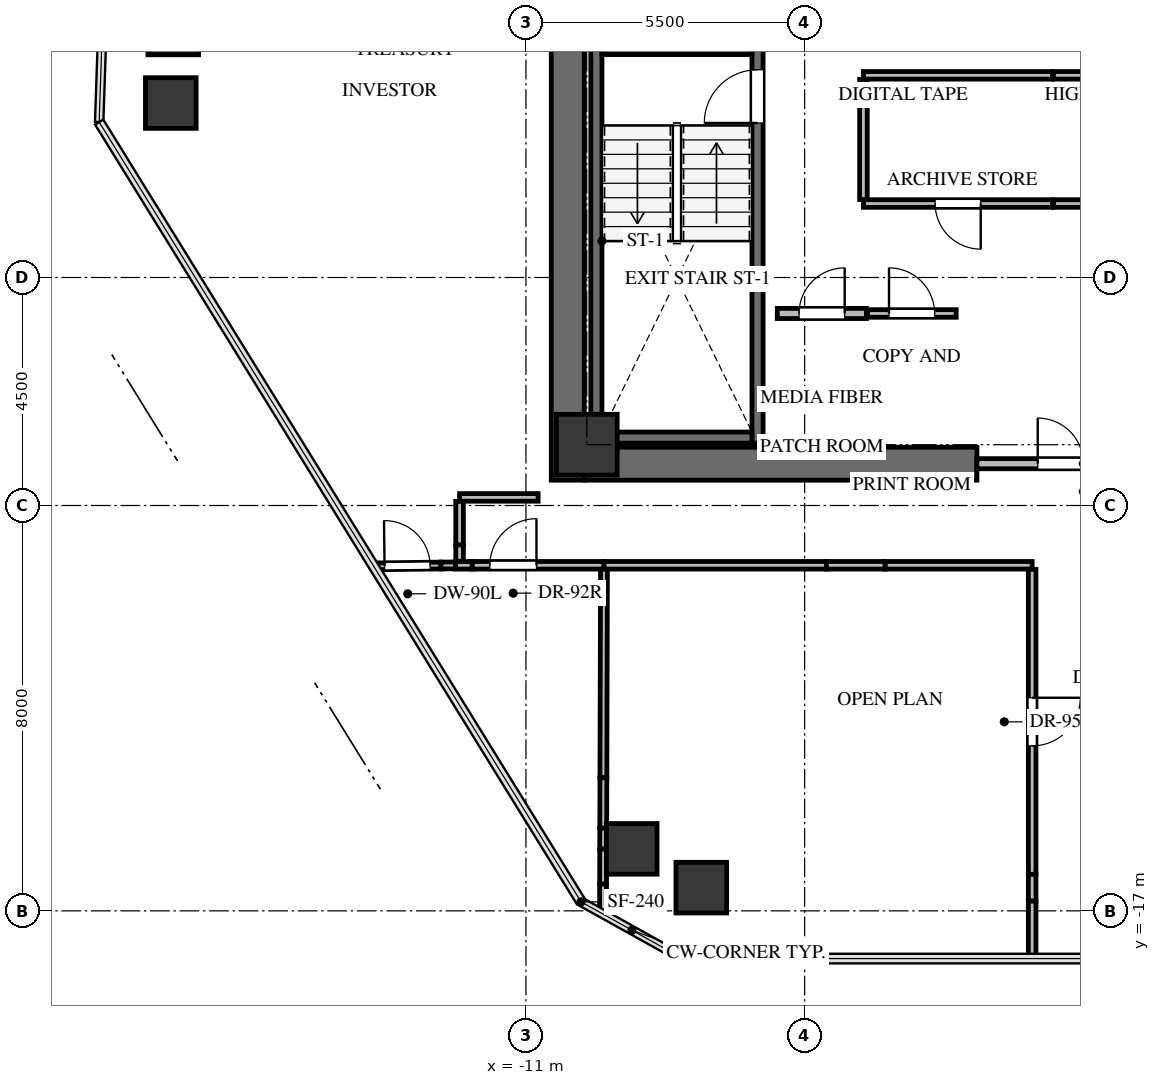
"""IFC4 building model, lengths in metres.
Left out: names, types, materials, properties, quantities, classifications, styles, units other than length and angle.
Written with IfcOpenShell. Run it as: python <this file> out.ifc"""

import sys

from ifc_helpers import new_model, si_unit, direction, frame, frame_2d, origin, origin_2d, place, context, subcontext, project, spatial, rectangle, extrude, source, transform, mapped, element, fill, save


model = new_model("IFC4")
c1 = context("Model", 3, precision=1e-05, world=origin(), true_north=direction((0.0, 1.0)))
c2 = subcontext(c1, "Body", "Model", "MODEL_VIEW")
j1 = project(units=[si_unit("LENGTHUNIT", "METRE"), si_unit("PLANEANGLEUNIT", "RADIAN")], contexts=[c1])
p1 = place(None, origin())
s1 = spatial("IfcSite", under=j1, at=p1, CompositionType="ELEMENT")
p2 = place(p1, origin())
s2 = spatial("IfcBuilding", under=s1, at=p2, CompositionType="ELEMENT")
p3 = place(p2, frame((0.0, 0.0, 203.2)))
s3 = spatial("IfcBuildingStorey", under=s2, at=p3, CompositionType="ELEMENT", Elevation=203.2)
p4 = place(p3, frame((-10.175, -8.5, 0.0), z_axis=(0.0, 0.0, 1.0), x_axis=(0.0, 1.0, 0.0)))
e1 = element("IfcWall", 1, at=p4, inside=s3, PredefinedType="SHEAR", context=c2, shape_type="SweptSolid", body=[
    extrude(rectangle(XDim=17.0, YDim=0.65, at=frame_2d((8.5, 0.0))), origin(), (0.0, 0.0, 1.0), 3.0),
])
p5 = place(p3, frame((-9.85, -8.175, 0.0), z_axis=(0.0, 0.0, 1.0), x_axis=(1.0, 0.0, 0.0)))
e2 = element("IfcWall", 2, at=p5, inside=s3, PredefinedType="SHEAR", context=c2, shape_type="SweptSolid", body=[
    extrude(rectangle(XDim=7.75, YDim=0.65, at=frame_2d((3.875, 0.0))), origin(), (0.0, 0.0, 1.0), 3.0),
])
p6 = place(p3, frame((-6.43, -7.77, -0.24), z_axis=(0.0, 0.0, 1.0), x_axis=(0.0, 1.0, 0.0)))
e3 = element("IfcWall", 3, at=p6, inside=s3, PredefinedType="SHEAR", context=c2, shape_type="SweptSolid", body=[
    extrude(rectangle(XDim=7.89, YDim=0.22, at=frame_2d((3.945, 0.0))), origin(), (0.0, 0.0, 1.0), 3.0),
])
p7 = place(p6, frame((6.32, 0.0, 0.0)))
e4 = element("IfcOpeningElement", 4, at=p7, cuts=e3, PredefinedType="OPENING", context=c2, shape_type="SweptSolid", body=[
    extrude(rectangle(XDim=1.05, YDim=2.15, at=frame_2d((0.525, 1.075))), frame((0.0, 0.12, 0.0), z_axis=(0.0, -1.0, 0.0), x_axis=(1.0, 0.0, 0.0)), (0.0, 0.0, 1.0), 0.24),
])
p8 = place(p3, frame((-9.61, 0.12, -0.24), z_axis=(0.0, 0.0, 1.0), x_axis=(0.0, -1.0, 0.0)))
e5 = element("IfcWall", 5, at=p8, inside=s3, PredefinedType="SHEAR", context=c2, shape_type="SweptSolid", body=[
    extrude(rectangle(XDim=7.89, YDim=0.22, at=frame_2d((3.945, 0.0))), origin(), (0.0, 0.0, 1.0), 3.0),
])
for number, where, z_axis, x_axis in (
    (6, (-9.5, -7.66, -0.24), (0.0, 0.0, 1.0), (1.0, 0.0, 0.0)),
    (7, (-6.54, 0.01, -0.24), (0.0, 0.0, 1.0), (-1.0, 0.0, 0.0)),
):
    element("IfcWall", number, at=place(p3, frame(where, z_axis=z_axis, x_axis=x_axis)), inside=s3, PredefinedType="SHEAR", context=c2, shape_type="SweptSolid", body=[
        extrude(rectangle(XDim=2.96, YDim=0.22, at=frame_2d((1.48, 0.0))), origin(), (0.0, 0.0, 1.0), 3.0),
    ])
m1 = source(origin(), c2, "Body", "SweptSolid", [
    extrude(rectangle(XDim=1.2, YDim=1.2, at=origin_2d()), origin(), (0.0, 0.0, 1.0), 3.0),
])
p9 = place(p3, frame((-9.8, -7.8, -0.24), z_axis=(0.0, 0.0, 1.0), x_axis=(1.0, 0.0, 0.0)))
e8 = element("IfcColumn", 8, at=p9, inside=s3, PredefinedType="COLUMN", context=c2, shape_type="MappedRepresentation", body=[
    mapped(m1, transform((0.0, 0.0, 0.0), x_axis=(1.0, 0.0, 0.0), y_axis=(0.0, 1.0, 0.0), z_axis=(0.0, 0.0, 1.0), scale=1.0)),
])
m2 = source(origin(), c2, "Body", "SweptSolid", [
    extrude(rectangle(XDim=1.0, YDim=1.0, at=origin_2d()), origin(), (0.0, 0.0, 1.0), 3.0),
])
for number, where, z_axis, x_axis in (
    (9, (-8.913, -15.776, -0.24), (0.0, 0.0, 1.0), (1.0, 0.0, 0.0)),
    (10, (-18.009, -1.057, -0.24), (0.0, 0.0, 1.0), (1.0, 0.0, 0.0)),
    (11, (-17.96, 0.396, -0.24), (0.0, 0.0, 1.0), (1.0, 0.0, 0.0)),
    (12, (-7.54, -16.542, -0.24), (0.0, 0.0, 1.0), (1.0, 0.0, 0.0)),
):
    element("IfcColumn", number, at=place(p3, frame(where, z_axis=z_axis, x_axis=x_axis)), inside=s3, PredefinedType="COLUMN", context=c2, shape_type="MappedRepresentation", body=[
        mapped(m2, transform((0.0, 0.0, 0.0), x_axis=(1.0, 0.0, 0.0), y_axis=(0.0, 1.0, 0.0), z_axis=(0.0, 0.0, 1.0), scale=1.0)),
    ])
p10 = place(p3, frame((-2.1, -8.175, 0.0), z_axis=(0.0, 0.0, 1.0), x_axis=(1.0, 0.0, 0.0)))
e13 = element("IfcWall", 13, at=p10, inside=s3, PredefinedType="SOLIDWALL", context=c2, shape_type="SweptSolid", body=[
    extrude(rectangle(XDim=4.2, YDim=0.2, at=frame_2d((2.1, 0.0))), origin(), (0.0, 0.0, 1.0), 2.745),
])
p11 = place(p10, frame((1.2, 0.0, 0.0)))
e14 = element("IfcOpeningElement", 14, at=p11, cuts=e13, PredefinedType="OPENING", context=c2, shape_type="SweptSolid", body=[
    extrude(rectangle(XDim=1.8, YDim=2.15, at=frame_2d((0.9, 1.075))), frame((0.0, 0.11, 0.0), z_axis=(0.0, -1.0, 0.0), x_axis=(1.0, 0.0, 0.0)), (0.0, 0.0, 1.0), 0.22),
])
p12 = place(p3, frame((-6.04, -5.21, 0.0), z_axis=(0.0, 0.0, 1.0), x_axis=(1.0, 0.0, 0.0)))
e15 = element("IfcWall", 15, at=p12, inside=s3, PredefinedType="SOLIDWALL", context=c2, shape_type="SweptSolid", body=[
    extrude(rectangle(XDim=1.76, YDim=0.2, at=frame_2d((0.88, 0.0))), origin(), (0.0, 0.0, 1.0), 2.745),
])
p13 = place(p12, frame((0.43, 0.0, 0.0)))
e16 = element("IfcOpeningElement", 16, at=p13, cuts=e15, PredefinedType="OPENING", context=c2, shape_type="SweptSolid", body=[
    extrude(rectangle(XDim=0.9, YDim=2.05, at=frame_2d((0.45, 1.025))), frame((0.0, 0.11, 0.0), z_axis=(0.0, -1.0, 0.0), x_axis=(1.0, 0.0, 0.0)), (0.0, 0.0, 1.0), 0.22),
])
p14 = place(p3, frame((-4.26, -5.21, 0.0), z_axis=(0.0, 0.0, 1.0), x_axis=(1.0, 0.0, 0.0)))
e17 = element("IfcWall", 17, at=p14, inside=s3, PredefinedType="PARTITIONING", context=c2, shape_type="SweptSolid", body=[
    extrude(rectangle(XDim=1.75, YDim=0.15, at=frame_2d((0.875, 0.0))), origin(), (0.0, 0.0, 1.0), 2.745),
])
p15 = place(p14, frame((0.425, 0.0, 0.0)))
e18 = element("IfcOpeningElement", 18, at=p15, cuts=e17, PredefinedType="OPENING", context=c2, shape_type="SweptSolid", body=[
    extrude(rectangle(XDim=0.9, YDim=2.05, at=frame_2d((0.45, 1.025))), frame((0.0, 0.085, 0.0), z_axis=(0.0, -1.0, 0.0), x_axis=(1.0, 0.0, 0.0)), (0.0, 0.0, 1.0), 0.17),
])
p16 = place(p3, frame((-0.61, -3.04, 0.0), z_axis=(0.0, 0.0, 1.0), x_axis=(-1.0, 0.0, 0.0)))
e19 = element("IfcWall", 19, at=p16, inside=s3, PredefinedType="PARTITIONING", context=c2, shape_type="SweptSolid", body=[
    extrude(rectangle(XDim=3.73, YDim=0.15, at=frame_2d((1.865, 0.0))), origin(), (0.0, 0.0, 1.0), 2.745),
])
p17 = place(p16, frame((1.415, 0.0, 0.0)))
e20 = element("IfcOpeningElement", 20, at=p17, cuts=e19, PredefinedType="OPENING", context=c2, shape_type="SweptSolid", body=[
    extrude(rectangle(XDim=0.9, YDim=2.05, at=frame_2d((0.45, 1.025))), frame((0.0, 0.085, 0.0), z_axis=(0.0, -1.0, 0.0), x_axis=(1.0, 0.0, 0.0)), (0.0, 0.0, 1.0), 0.17),
])
p18 = place(p3, frame((-4.34, -0.51, 0.0), z_axis=(0.0, 0.0, 1.0), x_axis=(1.0, 0.0, 0.0)))
e21 = element("IfcWall", 21, at=p18, inside=s3, PredefinedType="PARTITIONING", context=c2, shape_type="SweptSolid", body=[
    extrude(rectangle(XDim=3.73, YDim=0.15, at=frame_2d((1.865, 0.0))), origin(), (0.0, 0.0, 1.0), 2.745),
])
p19 = place(p3, frame((-4.34, -2.961, 0.0), z_axis=(0.0, 0.0, 1.0), x_axis=(0.0, 1.0, 0.0)))
e22 = element("IfcWall", 22, at=p19, inside=s3, PredefinedType="PARTITIONING", context=c2, shape_type="SweptSolid", body=[
    extrude(rectangle(XDim=2.372, YDim=0.15, at=frame_2d((1.186, 0.0))), origin(), (0.0, 0.0, 1.0), 2.745),
])
p20 = place(p3, frame((3.14, -3.04, 0.0), z_axis=(0.0, 0.0, 1.0), x_axis=(-1.0, 0.0, 0.0)))
e23 = element("IfcWall", 23, at=p20, inside=s3, PredefinedType="PARTITIONING", context=c2, shape_type="SweptSolid", body=[
    extrude(rectangle(XDim=3.73, YDim=0.15, at=frame_2d((1.865, 0.0))), origin(), (0.0, 0.0, 1.0), 2.745),
])
p21 = place(p20, frame((1.415, 0.0, 0.0)))
e24 = element("IfcOpeningElement", 24, at=p21, cuts=e23, PredefinedType="OPENING", context=c2, shape_type="SweptSolid", body=[
    extrude(rectangle(XDim=0.9, YDim=2.05, at=frame_2d((0.45, 1.025))), frame((0.0, 0.085, 0.0), z_axis=(0.0, -1.0, 0.0), x_axis=(1.0, 0.0, 0.0)), (0.0, 0.0, 1.0), 0.17),
])
p22 = place(p3, frame((-0.59, -0.51, 0.0), z_axis=(0.0, 0.0, 1.0), x_axis=(1.0, 0.0, 0.0)))
e25 = element("IfcWall", 25, at=p22, inside=s3, PredefinedType="PARTITIONING", context=c2, shape_type="SweptSolid", body=[
    extrude(rectangle(XDim=3.73, YDim=0.15, at=frame_2d((1.865, 0.0))), origin(), (0.0, 0.0, 1.0), 2.745),
])
p23 = place(p3, frame((-12.062, -10.18, 0.0), z_axis=(0.0, 0.0, 1.0), x_axis=(1.0, 0.0, 0.0)))
e26 = element("IfcWall", 26, at=p23, inside=s3, PredefinedType="PARTITIONING", context=c2, shape_type="SweptSolid", body=[
    extrude(rectangle(XDim=2.603, YDim=0.15, at=frame_2d((1.301, 0.0))), origin(), (0.0, 0.0, 1.0), 2.745),
])
p24 = place(p23, frame((0.35, 0.0, 0.0)))
e27 = element("IfcOpeningElement", 27, at=p24, cuts=e26, PredefinedType="OPENING", context=c2, shape_type="SweptSolid", body=[
    extrude(rectangle(XDim=0.92, YDim=2.1, at=frame_2d((0.46, 1.05))), frame((0.0, 0.085, 0.0), z_axis=(0.0, -1.0, 0.0), x_axis=(1.0, 0.0, 0.0)), (0.0, 0.0, 1.0), 0.17),
])
p25 = place(p3, frame((-12.39, -10.18, 0.0), z_axis=(0.0, 0.0, 1.0), x_axis=(1.0, 0.0, 0.0)))
e28 = element("IfcWall", 28, at=p25, inside=s3, PredefinedType="PARTITIONING", context=c2, shape_type="SweptSolid", body=[
    extrude(rectangle(XDim=0.327, YDim=0.15, at=frame_2d((0.164, 0.0))), origin(), (0.0, 0.0, 1.0), 2.099),
])
p26 = place(p3, frame((-9.46, -10.18, 0.0), z_axis=(0.0, 0.0, 1.0), x_axis=(1.0, 0.0, 0.0)))
e29 = element("IfcWall", 29, at=p26, inside=s3, PredefinedType="PARTITIONING", context=c2, shape_type="SweptSolid", body=[
    extrude(rectangle(XDim=4.39, YDim=0.15, at=frame_2d((2.195, 0.0))), origin(), (0.0, 0.0, 1.0), 2.745),
])
p27 = place(p3, frame((-3.913, -10.18, 0.0), z_axis=(0.0, 0.0, 1.0), x_axis=(1.0, 0.0, 0.0)))
e30 = element("IfcWall", 30, at=p27, inside=s3, PredefinedType="PARTITIONING", context=c2, shape_type="SweptSolid", body=[
    extrude(rectangle(XDim=2.903, YDim=0.15, at=frame_2d((1.451, 0.0))), origin(), (0.0, 0.0, 1.0), 2.745),
])
p28 = place(p3, frame((-5.07, -10.18, 0.0), z_axis=(0.0, 0.0, 1.0), x_axis=(1.0, 0.0, 0.0)))
e31 = element("IfcWall", 31, at=p28, inside=s3, PredefinedType="PARTITIONING", context=c2, shape_type="SweptSolid", body=[
    extrude(rectangle(XDim=1.157, YDim=0.15, at=frame_2d((0.579, 0.0))), origin(), (0.0, 0.0, 1.0), 1.942),
])
p29 = place(p3, frame((-1.01, -10.259, 0.0), z_axis=(0.0, 0.0, 1.0), x_axis=(0.0, -1.0, 0.0)))
e32 = element("IfcWall", 32, at=p29, inside=s3, PredefinedType="PARTITIONING", context=c2, shape_type="SweptSolid", body=[
    extrude(rectangle(XDim=6.021, YDim=0.15, at=frame_2d((3.01, 0.0))), origin(), (0.0, 0.0, 1.0), 2.745),
])
p30 = place(p29, frame((2.535, 0.0, 0.0)))
e33 = element("IfcOpeningElement", 33, at=p30, cuts=e32, PredefinedType="OPENING", context=c2, shape_type="SweptSolid", body=[
    extrude(rectangle(XDim=0.95, YDim=2.1, at=frame_2d((0.475, 1.05))), frame((0.0, 0.085, 0.0), z_axis=(0.0, -1.0, 0.0), x_axis=(1.0, 0.0, 0.0)), (0.0, 0.0, 1.0), 0.17),
])
p31 = place(p3, frame((-1.01, -16.804, 0.0), z_axis=(0.0, 0.0, 1.0), x_axis=(0.0, -1.0, 0.0)))
e34 = element("IfcWall", 34, at=p31, inside=s3, PredefinedType="PARTITIONING", context=c2, shape_type="SweptSolid", body=[
    extrude(rectangle(XDim=1.137, YDim=0.15, at=frame_2d((0.569, 0.0))), origin(), (0.0, 0.0, 1.0), 2.745),
])
p32 = place(p3, frame((-1.01, -16.28, 0.0), z_axis=(0.0, 0.0, 1.0), x_axis=(0.0, -1.0, 0.0)))
e35 = element("IfcWall", 35, at=p32, inside=s3, PredefinedType="PARTITIONING", context=c2, shape_type="SweptSolid", body=[
    extrude(rectangle(XDim=0.525, YDim=0.15, at=frame_2d((0.262, 0.0))), origin(), (0.0, 0.0, 1.0), 2.099),
])
p33 = place(p3, frame((-10.76, -8.84, 0.0), z_axis=(0.0, 0.0, 1.0), x_axis=(-1.0, 0.0, 0.0)))
e36 = element("IfcWall", 36, at=p33, inside=s3, PredefinedType="PARTITIONING", context=c2, shape_type="SweptSolid", body=[
    extrude(rectangle(XDim=1.55, YDim=0.15, at=frame_2d((0.775, 0.0))), origin(), (0.0, 0.0, 1.0), 2.745),
])
p34 = place(p3, frame((-12.31, -8.919, 0.0), z_axis=(0.0, 0.0, 1.0), x_axis=(0.0, -1.0, 0.0)))
e37 = element("IfcWall", 37, at=p34, inside=s3, PredefinedType="PARTITIONING", context=c2, shape_type="SweptSolid", body=[
    extrude(rectangle(XDim=0.86, YDim=0.15, at=frame_2d((0.43, 0.0))), origin(), (0.0, 0.0, 1.0), 2.099),
])
p35 = place(p3, frame((-12.31, -9.779, 0.0), z_axis=(0.0, 0.0, 1.0), x_axis=(0.0, -1.0, 0.0)))
e38 = element("IfcWall", 38, at=p35, inside=s3, PredefinedType="PARTITIONING", context=c2, shape_type="SweptSolid", body=[
    extrude(rectangle(XDim=0.322, YDim=0.15, at=frame_2d((0.161, 0.0))), origin(), (0.0, 0.0, 1.0), 2.099),
])
p36 = place(p3, frame((-9.46, -10.259, 0.0), z_axis=(0.0, 0.0, 1.0), x_axis=(-0.002849160395, -0.999995941134, 0.0)))
e39 = element("IfcWall", 39, at=p36, inside=s3, PredefinedType="PARTITIONING", context=c2, shape_type="SweptSolid", body=[
    extrude(rectangle(XDim=4.113, YDim=0.135, at=frame_2d((2.057, 0.0))), origin(), (0.0, 0.0, 1.0), 2.099),
])
p37 = place(p3, frame((-9.475, -15.366, 0.0), z_axis=(0.0, 0.0, 1.0), x_axis=(-0.002946363169, -0.999995659463, 0.0)))
e40 = element("IfcWall", 40, at=p37, inside=s3, PredefinedType="PARTITIONING", context=c2, shape_type="SweptSolid", body=[
    extrude(rectangle(XDim=0.414, YDim=0.135, at=frame_2d((0.207, 0.0))), origin(), (0.0, 0.0, 1.0), 2.099),
])
p38 = place(p3, frame((-9.478, -16.469, 0.0), z_axis=(0.0, 0.0, 1.0), x_axis=(-0.002877094545, -0.999995861155, 0.0)))
e41 = element("IfcWall", 41, at=p38, inside=s3, PredefinedType="PARTITIONING", context=c2, shape_type="SweptSolid", body=[
    extrude(rectangle(XDim=0.594, YDim=0.135, at=frame_2d((0.297, 0.0))), origin(), (0.0, 0.0, 1.0), 2.745),
])
p39 = place(p3, frame((-9.472, -14.372, 0.0), z_axis=(0.0, 0.0, 1.0), x_axis=(-0.002701365389, -0.999996351306, 0.0)))
e42 = element("IfcWall", 42, at=p39, inside=s3, PredefinedType="PARTITIONING", context=c2, shape_type="SweptSolid", body=[
    extrude(rectangle(XDim=0.994, YDim=0.135, at=frame_2d((0.497, 0.0))), origin(), (0.0, 0.0, 1.0), 2.099),
])
p40 = place(p3, frame((-9.476, -15.781, 0.0), z_axis=(0.0, 0.0, 1.0), x_axis=(-0.0028358624, -0.999995978934, 0.0)))
e43 = element("IfcWall", 43, at=p40, inside=s3, PredefinedType="PARTITIONING", context=c2, shape_type="SweptSolid", body=[
    extrude(rectangle(XDim=0.689, YDim=0.135, at=frame_2d((0.344, 0.0))), origin(), (0.0, 0.0, 1.0), 1.577),
])
p41 = place(p3, frame((-14.004, -10.201, 0.0), z_axis=(0.0, 0.0, 1.0), x_axis=(0.999924024946, 0.012326570317, 0.0)))
e44 = element("IfcWall", 44, at=p41, inside=s3, PredefinedType="PARTITIONING", context=c2, shape_type="SweptSolid", body=[
    extrude(rectangle(XDim=1.327, YDim=0.135, at=frame_2d((0.664, 0.0))), origin(), (0.0, 0.0, 1.0), 2.745),
])
p42 = place(p41, frame((0.214, 0.0, 0.0)))
e45 = element("IfcOpeningElement", 45, at=p42, cuts=e44, PredefinedType="OPENING", context=c2, shape_type="SweptSolid", body=[
    extrude(rectangle(XDim=0.9, YDim=2.05, at=frame_2d((0.45, 1.025))), frame((0.0, 0.078, 0.0), z_axis=(0.0, -1.0, 0.0), x_axis=(1.0, 0.0, 0.0)), (0.0, 0.0, 1.0), 0.155),
])
p43 = place(p3, frame((-12.677, -10.185, 0.0), z_axis=(0.0, 0.0, 1.0), x_axis=(0.99991866361, 0.012754064587, 0.0)))
e46 = element("IfcWall", 46, at=p43, inside=s3, PredefinedType="PARTITIONING", context=c2, shape_type="SweptSolid", body=[
    extrude(rectangle(XDim=0.287, YDim=0.135, at=frame_2d((0.144, 0.0))), origin(), (0.0, 0.0, 1.0), 2.099),
])
m3 = source(origin(), c2, "Body", "SweptSolid", [
    extrude(rectangle(XDim=1.05, YDim=2.15, at=frame_2d((0.525, 1.075))), frame((0.0, 0.025, 0.0), z_axis=(0.0, -1.0, 0.0), x_axis=(1.0, 0.0, 0.0)), (0.0, 0.0, 1.0), 0.05),
])
p44 = place(p7, origin())
e47 = element("IfcDoor", 47, at=p44, inside=s3, OperationType="SINGLE_SWING_LEFT", PredefinedType="DOOR", context=c2, shape_type="MappedRepresentation", body=[
    mapped(m3, transform((0.0, 0.0, 0.0), x_axis=(1.0, 0.0, 0.0), y_axis=(0.0, 1.0, 0.0), z_axis=(0.0, 0.0, 1.0), scale=1.0)),
])
fill(e4, e47)
m4 = source(origin(), c2, "Body", "SweptSolid", [
    extrude(rectangle(XDim=1.8, YDim=2.15, at=frame_2d((0.9, 1.075))), frame((0.0, 0.025, 0.0), z_axis=(0.0, -1.0, 0.0), x_axis=(1.0, 0.0, 0.0)), (0.0, 0.0, 1.0), 0.05),
])
p45 = place(p11, origin())
e48 = element("IfcDoor", 48, at=p45, inside=s3, OperationType="DOUBLE_DOOR_SINGLE_SWING", PredefinedType="DOOR", context=c2, shape_type="MappedRepresentation", body=[
    mapped(m4, transform((0.0, 0.0, 0.0), x_axis=(1.0, 0.0, 0.0), y_axis=(0.0, 1.0, 0.0), z_axis=(0.0, 0.0, 1.0), scale=1.0)),
])
fill(e14, e48)
m5 = source(origin(), c2, "Body", "SweptSolid", [
    extrude(rectangle(XDim=0.9, YDim=2.05, at=frame_2d((0.45, 1.025))), frame((0.0, 0.025, 0.0), z_axis=(0.0, -1.0, 0.0), x_axis=(1.0, 0.0, 0.0)), (0.0, 0.0, 1.0), 0.05),
])
p46 = place(p13, origin())
e49 = element("IfcDoor", 49, at=p46, inside=s3, OperationType="SINGLE_SWING_RIGHT", PredefinedType="DOOR", context=c2, shape_type="MappedRepresentation", body=[
    mapped(m5, transform((0.0, 0.0, 0.0), x_axis=(1.0, 0.0, 0.0), y_axis=(0.0, 1.0, 0.0), z_axis=(0.0, 0.0, 1.0), scale=1.0)),
])
fill(e16, e49)
m6 = source(origin(), c2, "Body", "SweptSolid", [
    extrude(rectangle(XDim=0.9, YDim=2.05, at=frame_2d((0.45, 1.025))), frame((0.0, 0.025, 0.0), z_axis=(0.0, -1.0, 0.0), x_axis=(1.0, 0.0, 0.0)), (0.0, 0.0, 1.0), 0.05),
])
p47 = place(p15, origin())
e50 = element("IfcDoor", 50, at=p47, inside=s3, OperationType="SINGLE_SWING_LEFT", PredefinedType="DOOR", context=c2, shape_type="MappedRepresentation", body=[
    mapped(m6, transform((0.0, 0.0, 0.0), x_axis=(1.0, 0.0, 0.0), y_axis=(0.0, 1.0, 0.0), z_axis=(0.0, 0.0, 1.0), scale=1.0)),
])
fill(e18, e50)
p48 = place(p17, origin())
e51 = element("IfcDoor", 51, at=p48, inside=s3, OperationType="SINGLE_SWING_LEFT", PredefinedType="DOOR", context=c2, shape_type="MappedRepresentation", body=[
    mapped(m6, transform((0.0, 0.0, 0.0), x_axis=(1.0, 0.0, 0.0), y_axis=(0.0, 1.0, 0.0), z_axis=(0.0, 0.0, 1.0), scale=1.0)),
])
fill(e20, e51)
m7 = source(origin(), c2, "Body", "SweptSolid", [
    extrude(rectangle(XDim=0.92, YDim=2.1, at=frame_2d((0.46, 1.05))), frame((0.0, 0.025, 0.0), z_axis=(0.0, -1.0, 0.0), x_axis=(1.0, 0.0, 0.0)), (0.0, 0.0, 1.0), 0.05),
])
p49 = place(p24, origin())
e52 = element("IfcDoor", 52, at=p49, inside=s3, OperationType="SINGLE_SWING_RIGHT", PredefinedType="DOOR", context=c2, shape_type="MappedRepresentation", body=[
    mapped(m7, transform((0.0, 0.0, 0.0), x_axis=(1.0, 0.0, 0.0), y_axis=(0.0, 1.0, 0.0), z_axis=(0.0, 0.0, 1.0), scale=1.0)),
])
fill(e27, e52)
m8 = source(origin(), c2, "Body", "SweptSolid", [
    extrude(rectangle(XDim=0.95, YDim=2.1, at=frame_2d((0.475, 1.05))), frame((0.0, 0.025, 0.0), z_axis=(0.0, -1.0, 0.0), x_axis=(1.0, 0.0, 0.0)), (0.0, 0.0, 1.0), 0.05),
])
p50 = place(p30, origin())
e53 = element("IfcDoor", 53, at=p50, inside=s3, OperationType="SINGLE_SWING_LEFT", PredefinedType="DOOR", context=c2, shape_type="MappedRepresentation", body=[
    mapped(m8, transform((0.0, 0.0, 0.0), x_axis=(1.0, 0.0, 0.0), y_axis=(0.0, 1.0, 0.0), z_axis=(0.0, 0.0, 1.0), scale=1.0)),
])
fill(e33, e53)
m9 = source(origin(), c2, "Body", "SweptSolid", [
    extrude(rectangle(XDim=0.9, YDim=2.05, at=frame_2d((0.45, 1.025))), frame((0.0, 0.025, 0.0), z_axis=(0.0, -1.0, 0.0), x_axis=(1.0, 0.0, 0.0)), (0.0, 0.0, 1.0), 0.05),
])
p51 = place(p42, origin())
e54 = element("IfcDoor", 54, at=p51, inside=s3, OperationType="SINGLE_SWING_LEFT", PredefinedType="DOOR", context=c2, shape_type="MappedRepresentation", body=[
    mapped(m9, transform((0.0, 0.0, 0.0), x_axis=(1.0, 0.0, 0.0), y_axis=(0.0, 1.0, 0.0), z_axis=(0.0, 0.0, 1.0), scale=1.0)),
])
fill(e45, e54)
save(model, sys.argv[1])
